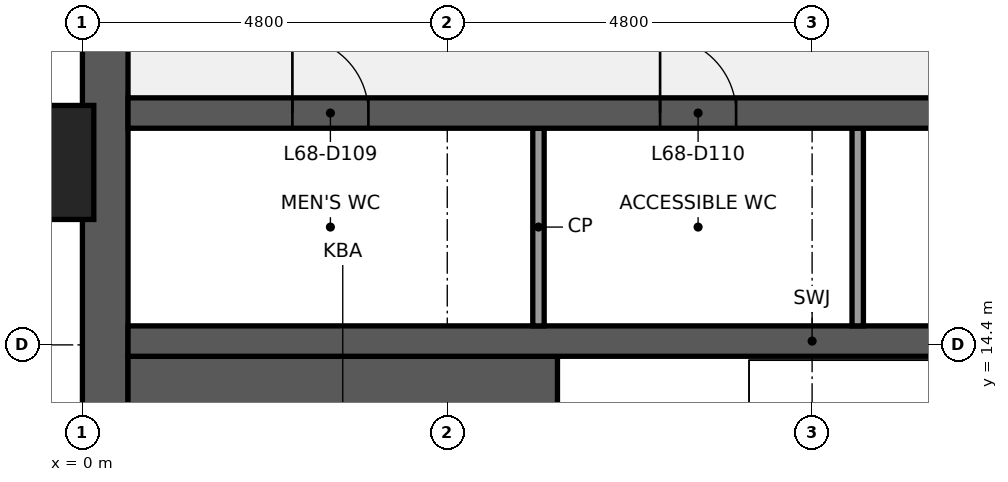
"""IFC4 building model, lengths in metres.
Left out: names, types, materials, properties, quantities, classifications, styles, units other than length and angle.
Written with IfcOpenShell. Run it as: python <this file> out.ifc"""

import sys

from ifc_helpers import new_model, si_unit, direction, frame, frame_2d, origin, origin_2d, place, context, subcontext, project, spatial, rectangle, extrude, element, fill, save


model = new_model("IFC4")
c1 = context("Model", 3, precision=1e-05, world=origin(), true_north=direction((0.0, 1.0)))
c2 = subcontext(c1, "Body", "Model", "MODEL_VIEW")
j1 = project(units=[si_unit("LENGTHUNIT", "METRE"), si_unit("PLANEANGLEUNIT", "RADIAN")], contexts=[c1])
p1 = place(None, origin())
s1 = spatial("IfcSite", under=j1, at=p1, CompositionType="ELEMENT")
p2 = place(p1, origin())
s2 = spatial("IfcBuilding", under=s1, at=p2, CompositionType="ELEMENT")
p3 = place(p2, frame((0.0, 0.0, 310.3)))
s3 = spatial("IfcBuildingStorey", under=s2, at=p3, CompositionType="ELEMENT", Elevation=310.3)
p4 = place(p3, frame((0.3, 9.6, 0.0), z_axis=(0.0, 0.0, 1.0), x_axis=(0.0, 1.0, 0.0)))
e1 = element("IfcWall", 1, at=p4, inside=s3, PredefinedType="SHEAR", context=c2, shape_type="SweptSolid", body=[
    extrude(rectangle(XDim=28.8, YDim=0.6, at=frame_2d((14.4, 0.0))), origin(), (0.0, 0.0, 1.0), 3.84),
])
p5 = place(p4, frame((8.85, 0.0, 0.9)))
e2 = element("IfcOpeningElement", 2, at=p5, cuts=e1, PredefinedType="OPENING", context=c2, shape_type="SweptSolid", body=[
    extrude(rectangle(XDim=1.5, YDim=1.5, at=frame_2d((0.75, 0.75))), frame((0.0, 0.31, 0.0), z_axis=(0.0, -1.0, 0.0), x_axis=(1.0, 0.0, 0.0)), (0.0, 0.0, 1.0), 0.62),
])
p6 = place(p4, frame((18.45, 0.0, 0.9)))
e3 = element("IfcOpeningElement", 3, at=p6, cuts=e1, PredefinedType="OPENING", context=c2, shape_type="SweptSolid", body=[
    extrude(rectangle(XDim=1.5, YDim=1.5, at=frame_2d((0.75, 0.75))), frame((0.0, 0.31, 0.0), z_axis=(0.0, -1.0, 0.0), x_axis=(1.0, 0.0, 0.0)), (0.0, 0.0, 1.0), 0.62),
])
p7 = place(p3, frame((0.6, 12.225, 0.0), z_axis=(0.0, 0.0, 1.0), x_axis=(1.0, 0.0, 0.0)))
e4 = element("IfcWall", 4, at=p7, inside=s3, PredefinedType="SHEAR", context=c2, shape_type="SweptSolid", body=[
    extrude(rectangle(XDim=5.65, YDim=4.05, at=frame_2d((2.825, 0.0))), origin(), (0.0, 0.0, 1.0), 3.84),
])
p8 = place(p3, frame((0.6, 14.45, 0.0), z_axis=(0.0, 0.0, 1.0), x_axis=(1.0, 0.0, 0.0)))
e5 = element("IfcWall", 5, at=p8, inside=s3, PredefinedType="SHEAR", context=c2, shape_type="SweptSolid", body=[
    extrude(rectangle(XDim=18.0, YDim=0.4, at=frame_2d((9.0, 0.0))), origin(), (0.0, 0.0, 1.0), 3.84),
])
for number, where, z_axis, x_axis in (
    (6, (6.0, 14.65, 0.0), (0.0, 0.0, 1.0), (0.0, 1.0, 0.0)),
    (7, (10.2, 14.65, 0.0), (0.0, 0.0, 1.0), (0.0, 1.0, 0.0)),
):
    element("IfcWall", number, at=place(p3, frame(where, z_axis=z_axis, x_axis=x_axis)), inside=s3, PredefinedType="PARTITIONING", context=c2, shape_type="SweptSolid", body=[
        extrude(rectangle(XDim=2.6, YDim=0.15, at=frame_2d((1.3, 0.0))), origin(), (0.0, 0.0, 1.0), 3.84),
    ])
p9 = place(p3, frame((0.6, 17.45, 0.0), z_axis=(0.0, 0.0, 1.0), x_axis=(1.0, 0.0, 0.0)))
e8 = element("IfcWall", 8, at=p9, inside=s3, PredefinedType="SHEAR", context=c2, shape_type="SweptSolid", body=[
    extrude(rectangle(XDim=18.0, YDim=0.4, at=frame_2d((9.0, 0.0))), origin(), (0.0, 0.0, 1.0), 3.84),
])
p10 = place(p9, frame((2.163, 0.0, 0.0)))
e9 = element("IfcOpeningElement", 9, at=p10, cuts=e8, PredefinedType="OPENING", context=c2, shape_type="SweptSolid", body=[
    extrude(rectangle(XDim=1.0, YDim=2.1, at=frame_2d((0.5, 1.05))), frame((0.0, 0.21, 0.0), z_axis=(0.0, -1.0, 0.0), x_axis=(1.0, 0.0, 0.0)), (0.0, 0.0, 1.0), 0.42),
])
p11 = place(p9, frame((7.0, 0.0, 0.0)))
e10 = element("IfcOpeningElement", 10, at=p11, cuts=e8, PredefinedType="OPENING", context=c2, shape_type="SweptSolid", body=[
    extrude(rectangle(XDim=1.0, YDim=2.1, at=frame_2d((0.5, 1.05))), frame((0.0, 0.21, 0.0), z_axis=(0.0, -1.0, 0.0), x_axis=(1.0, 0.0, 0.0)), (0.0, 0.0, 1.0), 0.42),
])
p12 = place(p9, frame((11.5, 0.0, 0.0)))
e11 = element("IfcOpeningElement", 11, at=p12, cuts=e8, PredefinedType="OPENING", context=c2, shape_type="SweptSolid", body=[
    extrude(rectangle(XDim=1.0, YDim=2.1, at=frame_2d((0.5, 1.05))), frame((0.0, 0.21, 0.0), z_axis=(0.0, -1.0, 0.0), x_axis=(1.0, 0.0, 0.0)), (0.0, 0.0, 1.0), 0.42),
])
p13 = place(p9, frame((15.738, 0.0, 0.0)))
e12 = element("IfcOpeningElement", 12, at=p13, cuts=e8, PredefinedType="OPENING", context=c2, shape_type="SweptSolid", body=[
    extrude(rectangle(XDim=1.0, YDim=2.1, at=frame_2d((0.5, 1.05))), frame((0.0, 0.21, 0.0), z_axis=(0.0, -1.0, 0.0), x_axis=(1.0, 0.0, 0.0)), (0.0, 0.0, 1.0), 0.42),
])
p14 = place(p3, frame((-0.75, 16.8, 0.0), z_axis=(0.0, 0.0, 1.0), x_axis=(0.0, 1.0, 0.0)))
e13 = element("IfcColumn", 13, at=p14, inside=s3, PredefinedType="PILASTER", context=c2, shape_type="SweptSolid", body=[
    extrude(rectangle(XDim=1.8, YDim=1.5, at=origin_2d()), origin(), (0.0, 0.0, 1.0), 4.0),
])
p15 = place(p10, origin())
e14 = element("IfcDoor", 14, at=p15, inside=s3, OperationType="SINGLE_SWING_LEFT", PredefinedType="DOOR", context=c2, shape_type="SweptSolid", body=[
    extrude(rectangle(XDim=1.0, YDim=2.1, at=frame_2d((0.5, 1.05))), frame((0.0, 0.025, 0.0), z_axis=(0.0, -1.0, 0.0), x_axis=(1.0, 0.0, 0.0)), (0.0, 0.0, 1.0), 0.05),
])
fill(e9, e14)
p16 = place(p11, origin())
e15 = element("IfcDoor", 15, at=p16, inside=s3, OperationType="SINGLE_SWING_LEFT", PredefinedType="DOOR", context=c2, shape_type="SweptSolid", body=[
    extrude(rectangle(XDim=1.0, YDim=2.1, at=frame_2d((0.5, 1.05))), frame((0.0, 0.025, 0.0), z_axis=(0.0, -1.0, 0.0), x_axis=(1.0, 0.0, 0.0)), (0.0, 0.0, 1.0), 0.05),
])
fill(e10, e15)
save(model, sys.argv[1])
